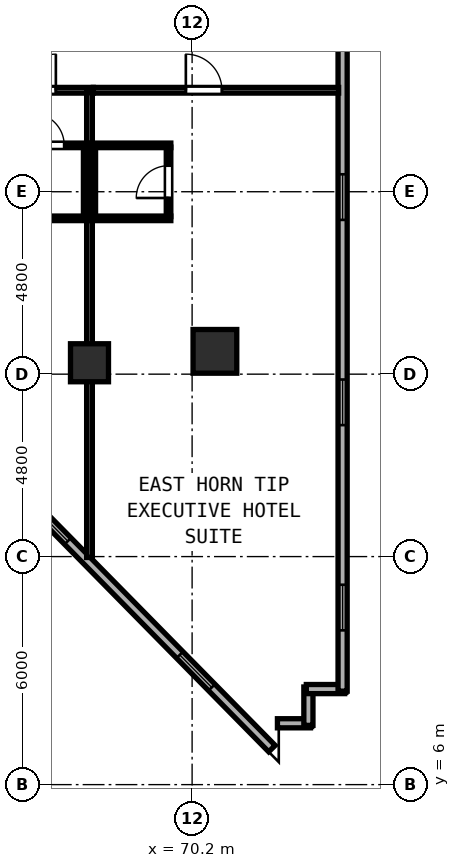
"""IFC4 building model, lengths in metres.
Left out: names, types, materials, properties, quantities, classifications, styles, units other than length and angle.
Written with IfcOpenShell. Run it as: python <this file> out.ifc"""

import sys

from ifc_helpers import new_model, si_unit, direction, frame, frame_2d, origin, origin_2d, place, context, subcontext, project, spatial, rectangle, hollow_rectangle, extrude, element, fill, save


model = new_model("IFC4")
c1 = context("Model", 3, precision=1e-05, world=origin(), true_north=direction((0.0, 1.0)))
c2 = subcontext(c1, "Body", "Model", "MODEL_VIEW")
j1 = project(units=[si_unit("LENGTHUNIT", "METRE"), si_unit("PLANEANGLEUNIT", "RADIAN")], contexts=[c1])
p1 = place(None, origin())
s1 = spatial("IfcSite", under=j1, at=p1, CompositionType="ELEMENT")
p2 = place(p1, origin())
s2 = spatial("IfcBuilding", under=s1, at=p2, CompositionType="ELEMENT")
p3 = place(p2, frame((0.0, 0.0, 39.2)))
s3 = spatial("IfcBuildingStorey", under=s2, at=p3, CompositionType="ELEMENT", Elevation=39.2)
p4 = place(p3, frame((70.8, 17.4, 0.0), z_axis=(0.0, 0.0, 1.0), x_axis=(1.0, 0.0, 0.0)))
e1 = element("IfcColumn", 1, at=p4, inside=s3, PredefinedType="COLUMN", context=c2, shape_type="SweptSolid", body=[
    extrude(hollow_rectangle(XDim=1.15, YDim=1.15, WallThickness=0.042, at=origin_2d()), origin(), (0.0, 0.0, 1.0), 3.8),
])
p5 = place(p3, frame((67.5, 17.1, 0.0), z_axis=(0.0, 0.0, 1.0), x_axis=(1.0, 0.0, 0.0)))
e2 = element("IfcColumn", 2, at=p5, inside=s3, PredefinedType="COLUMN", context=c2, shape_type="SweptSolid", body=[
    extrude(hollow_rectangle(XDim=1.0, YDim=1.0, WallThickness=0.038, at=origin_2d()), origin(), (0.0, 0.0, 1.0), 3.8),
])
p6 = place(p3, frame((64.966, 14.403, 0.0), z_axis=(0.0, 0.0, 1.0), x_axis=(0.701329027825, -0.712837705744, 0.0)))
e3 = element("IfcWall", 3, at=p6, inside=s3, PredefinedType="SOLIDWALL", context=c2, shape_type="SweptSolid", body=[
    extrude(rectangle(XDim=10.458, YDim=0.24, at=frame_2d((5.229, 0.0))), origin(), (0.0, 0.0, 1.0), 3.54),
])
p7 = place(p6, frame((1.6, 0.0, 0.85)))
e4 = element("IfcOpeningElement", 4, at=p7, cuts=e3, PredefinedType="OPENING", context=c2, shape_type="SweptSolid", body=[
    extrude(rectangle(XDim=1.2, YDim=1.85, at=frame_2d((0.6, 0.925))), frame((0.0, 0.13, 0.0), z_axis=(0.0, -1.0, 0.0), x_axis=(1.0, 0.0, 0.0)), (0.0, 0.0, 1.0), 0.26),
])
p8 = place(p6, frame((7.0, 0.0, 0.85)))
e5 = element("IfcOpeningElement", 5, at=p8, cuts=e3, PredefinedType="OPENING", context=c2, shape_type="SweptSolid", body=[
    extrude(rectangle(XDim=1.2, YDim=1.85, at=frame_2d((0.6, 0.925))), frame((0.0, 0.13, 0.0), z_axis=(0.0, -1.0, 0.0), x_axis=(1.0, 0.0, 0.0)), (0.0, 0.0, 1.0), 0.26),
])
p9 = place(p3, frame((72.445, 7.614, 0.0), z_axis=(0.0, 0.0, 1.0), x_axis=(1.0, 0.0, 0.0)))
e6 = element("IfcWall", 6, at=p9, inside=s3, PredefinedType="SOLIDWALL", context=c2, shape_type="SweptSolid", body=[
    extrude(rectangle(XDim=0.87, YDim=0.24, at=frame_2d((0.435, 0.0))), origin(), (0.0, 0.0, 1.0), 3.54),
])
for number, where, z_axis, x_axis in (
    (7, (73.26, 7.559, 0.0), (0.0, 0.0, 1.0), (0.0, 1.0, 0.0)),
    (8, (73.205, 8.514, 0.0), (0.0, 0.0, 1.0), (1.0, 0.0, 0.0)),
):
    element("IfcWall", number, at=place(p3, frame(where, z_axis=z_axis, x_axis=x_axis)), inside=s3, PredefinedType="SOLIDWALL", context=c2, shape_type="SweptSolid", body=[
        extrude(rectangle(XDim=1.01, YDim=0.24, at=frame_2d((0.505, 0.0))), origin(), (0.0, 0.0, 1.0), 3.54),
    ])
p10 = place(p3, frame((74.16, 8.459, 0.0), z_axis=(0.0, 0.0, 1.0), x_axis=(0.0, 1.0, 0.0)))
e9 = element("IfcWall", 9, at=p10, inside=s3, PredefinedType="SOLIDWALL", context=c2, shape_type="SweptSolid", body=[
    extrude(rectangle(XDim=20.349, YDim=0.24, at=frame_2d((10.175, 0.0))), origin(), (0.0, 0.0, 1.0), 3.54),
])
p11 = place(p10, frame((1.6, 0.0, 0.85)))
e10 = element("IfcOpeningElement", 10, at=p11, cuts=e9, PredefinedType="OPENING", context=c2, shape_type="SweptSolid", body=[
    extrude(rectangle(XDim=1.2, YDim=1.85, at=frame_2d((0.6, 0.925))), frame((0.0, 0.13, 0.0), z_axis=(0.0, -1.0, 0.0), x_axis=(1.0, 0.0, 0.0)), (0.0, 0.0, 1.0), 0.26),
])
p12 = place(p10, frame((7.0, 0.0, 0.85)))
e11 = element("IfcOpeningElement", 11, at=p12, cuts=e9, PredefinedType="OPENING", context=c2, shape_type="SweptSolid", body=[
    extrude(rectangle(XDim=1.2, YDim=1.85, at=frame_2d((0.6, 0.925))), frame((0.0, 0.13, 0.0), z_axis=(0.0, -1.0, 0.0), x_axis=(1.0, 0.0, 0.0)), (0.0, 0.0, 1.0), 0.26),
])
p13 = place(p10, frame((12.4, 0.0, 0.85)))
e12 = element("IfcOpeningElement", 12, at=p13, cuts=e9, PredefinedType="OPENING", context=c2, shape_type="SweptSolid", body=[
    extrude(rectangle(XDim=1.2, YDim=1.85, at=frame_2d((0.6, 0.925))), frame((0.0, 0.13, 0.0), z_axis=(0.0, -1.0, 0.0), x_axis=(1.0, 0.0, 0.0)), (0.0, 0.0, 1.0), 0.26),
])
p14 = place(p10, frame((17.8, 0.0, 0.85)))
e13 = element("IfcOpeningElement", 13, at=p14, cuts=e9, PredefinedType="OPENING", context=c2, shape_type="SweptSolid", body=[
    extrude(rectangle(XDim=1.2, YDim=1.85, at=frame_2d((0.6, 0.925))), frame((0.0, 0.13, 0.0), z_axis=(0.0, -1.0, 0.0), x_axis=(1.0, 0.0, 0.0)), (0.0, 0.0, 1.0), 0.26),
])
p15 = place(p3, frame((65.102, 24.27, 0.0), z_axis=(0.0, 0.0, 1.0), x_axis=(1.0, 0.0, 0.0)))
e14 = element("IfcWall", 14, at=p15, inside=s3, PredefinedType="PARTITIONING", context=c2, shape_type="SweptSolid", body=[
    extrude(rectangle(XDim=2.498, YDim=0.15, at=frame_2d((1.249, 0.0))), origin(), (0.0, 0.0, 1.0), 3.54),
])
p16 = place(p15, frame((1.513, 0.0, 0.0), z_axis=(0.0, 0.0, 1.0), x_axis=(-1.0, 0.0, 0.0)))
e15 = element("IfcOpeningElement", 15, at=p16, cuts=e14, PredefinedType="OPENING", context=c2, shape_type="SweptSolid", body=[
    extrude(rectangle(XDim=0.95, YDim=2.15, at=frame_2d((0.475, 1.075))), frame((0.0, 0.085, 0.0), z_axis=(0.0, -1.0, 0.0), x_axis=(1.0, 0.0, 0.0)), (0.0, 0.0, 1.0), 0.17),
])
p17 = place(p3, frame((67.5, 11.977, 0.0), z_axis=(0.0, 0.0, 1.0), x_axis=(0.0, 1.0, 0.0)))
e16 = element("IfcWall", 16, at=p17, inside=s3, PredefinedType="PARTITIONING", context=c2, shape_type="SweptSolid", body=[
    extrude(rectangle(XDim=12.233, YDim=0.15, at=frame_2d((6.117, 0.0))), origin(), (0.0, 0.0, 1.0), 3.54),
])
p18 = place(p3, frame((65.36, 22.82, 0.0), z_axis=(0.0, 0.0, 1.0), x_axis=(1.0, 0.0, 0.0)))
e17 = element("IfcWall", 17, at=p18, inside=s3, PredefinedType="PARTITIONING", context=c2, shape_type="SweptSolid", body=[
    extrude(rectangle(XDim=2.08, YDim=0.12, at=frame_2d((1.04, 0.0))), origin(), (0.0, 0.0, 1.0), 3.54),
])
p19 = place(p18, frame((1.475, 0.0, 0.0), z_axis=(0.0, 0.0, 1.0), x_axis=(-1.0, 0.0, 0.0)))
e18 = element("IfcOpeningElement", 18, at=p19, cuts=e17, PredefinedType="OPENING", context=c2, shape_type="SweptSolid", body=[
    extrude(rectangle(XDim=0.85, YDim=2.1, at=frame_2d((0.425, 1.05))), frame((0.0, 0.07, 0.0), z_axis=(0.0, -1.0, 0.0), x_axis=(1.0, 0.0, 0.0)), (0.0, 0.0, 1.0), 0.14),
])
p20 = place(p3, frame((65.36, 20.9, 0.0), z_axis=(0.0, 0.0, 1.0), x_axis=(1.0, 0.0, 0.0)))
e19 = element("IfcWall", 19, at=p20, inside=s3, PredefinedType="PARTITIONING", context=c2, shape_type="SweptSolid", body=[
    extrude(rectangle(XDim=2.08, YDim=0.12, at=frame_2d((1.04, 0.0))), origin(), (0.0, 0.0, 1.0), 3.54),
])
p21 = place(p3, frame((67.4, 20.945, 0.0), z_axis=(0.0, 0.0, 1.0), x_axis=(0.0, 1.0, 0.0)))
e20 = element("IfcWall", 20, at=p21, inside=s3, PredefinedType="PARTITIONING", context=c2, shape_type="SweptSolid", body=[
    extrude(rectangle(XDim=1.83, YDim=0.12, at=frame_2d((0.915, 0.0))), origin(), (0.0, 0.0, 1.0), 3.54),
])
p22 = place(p3, frame((67.602, 24.27, 0.0), z_axis=(0.0, 0.0, 1.0), x_axis=(1.0, 0.0, 0.0)))
e21 = element("IfcWall", 21, at=p22, inside=s3, PredefinedType="PARTITIONING", context=c2, shape_type="SweptSolid", body=[
    extrude(rectangle(XDim=6.453, YDim=0.15, at=frame_2d((3.227, 0.0))), origin(), (0.0, 0.0, 1.0), 3.54),
])
p23 = place(p22, frame((3.383, 0.0, 0.0), z_axis=(0.0, 0.0, 1.0), x_axis=(-1.0, 0.0, 0.0)))
e22 = element("IfcOpeningElement", 22, at=p23, cuts=e21, PredefinedType="OPENING", context=c2, shape_type="SweptSolid", body=[
    extrude(rectangle(XDim=0.95, YDim=2.18, at=frame_2d((0.475, 1.09))), frame((0.0, 0.085, 0.0), z_axis=(0.0, -1.0, 0.0), x_axis=(1.0, 0.0, 0.0)), (0.0, 0.0, 1.0), 0.17),
])
for number, where, z_axis, x_axis in (
    (23, (67.56, 22.82, 0.0), (0.0, 0.0, 1.0), (1.0, 0.0, 0.0)),
    (24, (67.56, 20.9, 0.0), (0.0, 0.0, 1.0), (1.0, 0.0, 0.0)),
):
    element("IfcWall", number, at=place(p3, frame(where, z_axis=z_axis, x_axis=x_axis)), inside=s3, PredefinedType="PARTITIONING", context=c2, shape_type="SweptSolid", body=[
        extrude(rectangle(XDim=2.08, YDim=0.12, at=frame_2d((1.04, 0.0))), origin(), (0.0, 0.0, 1.0), 3.54),
    ])
p24 = place(p3, frame((67.6, 20.945, 0.0), z_axis=(0.0, 0.0, 1.0), x_axis=(0.0, 1.0, 0.0)))
e25 = element("IfcWall", 25, at=p24, inside=s3, PredefinedType="PARTITIONING", context=c2, shape_type="SweptSolid", body=[
    extrude(rectangle(XDim=1.83, YDim=0.12, at=frame_2d((0.915, 0.0))), origin(), (0.0, 0.0, 1.0), 3.54),
])
p25 = place(p3, frame((69.58, 20.945, 0.0), z_axis=(0.0, 0.0, 1.0), x_axis=(0.0, 1.0, 0.0)))
e26 = element("IfcWall", 26, at=p25, inside=s3, PredefinedType="PARTITIONING", context=c2, shape_type="SweptSolid", body=[
    extrude(rectangle(XDim=1.83, YDim=0.12, at=frame_2d((0.915, 0.0))), origin(), (0.0, 0.0, 1.0), 3.54),
])
p26 = place(p25, frame((0.49, 0.0, 0.0)))
e27 = element("IfcOpeningElement", 27, at=p26, cuts=e26, PredefinedType="OPENING", context=c2, shape_type="SweptSolid", body=[
    extrude(rectangle(XDim=0.85, YDim=2.1, at=frame_2d((0.425, 1.05))), frame((0.0, 0.07, 0.0), z_axis=(0.0, -1.0, 0.0), x_axis=(1.0, 0.0, 0.0)), (0.0, 0.0, 1.0), 0.14),
])
p27 = place(p7, origin())
e28 = element("IfcWindow", 28, at=p27, inside=s3, PartitioningType="SINGLE_PANEL", PredefinedType="WINDOW", context=c2, shape_type="SweptSolid", body=[
    extrude(rectangle(XDim=1.2, YDim=1.85, at=frame_2d((0.6, 0.925))), frame((0.0, 0.03, 0.0), z_axis=(0.0, -1.0, 0.0), x_axis=(1.0, 0.0, 0.0)), (0.0, 0.0, 1.0), 0.06),
])
fill(e4, e28)
p28 = place(p8, origin())
e29 = element("IfcWindow", 29, at=p28, inside=s3, PartitioningType="SINGLE_PANEL", PredefinedType="WINDOW", context=c2, shape_type="SweptSolid", body=[
    extrude(rectangle(XDim=1.2, YDim=1.85, at=frame_2d((0.6, 0.925))), frame((0.0, 0.03, 0.0), z_axis=(0.0, -1.0, 0.0), x_axis=(1.0, 0.0, 0.0)), (0.0, 0.0, 1.0), 0.06),
])
fill(e5, e29)
p29 = place(p11, origin())
e30 = element("IfcWindow", 30, at=p29, inside=s3, PartitioningType="SINGLE_PANEL", PredefinedType="WINDOW", context=c2, shape_type="SweptSolid", body=[
    extrude(rectangle(XDim=1.2, YDim=1.85, at=frame_2d((0.6, 0.925))), frame((0.0, 0.03, 0.0), z_axis=(0.0, -1.0, 0.0), x_axis=(1.0, 0.0, 0.0)), (0.0, 0.0, 1.0), 0.06),
])
fill(e10, e30)
p30 = place(p12, origin())
e31 = element("IfcWindow", 31, at=p30, inside=s3, PartitioningType="SINGLE_PANEL", PredefinedType="WINDOW", context=c2, shape_type="SweptSolid", body=[
    extrude(rectangle(XDim=1.2, YDim=1.85, at=frame_2d((0.6, 0.925))), frame((0.0, 0.03, 0.0), z_axis=(0.0, -1.0, 0.0), x_axis=(1.0, 0.0, 0.0)), (0.0, 0.0, 1.0), 0.06),
])
fill(e11, e31)
p31 = place(p13, origin())
e32 = element("IfcWindow", 32, at=p31, inside=s3, PartitioningType="SINGLE_PANEL", PredefinedType="WINDOW", context=c2, shape_type="SweptSolid", body=[
    extrude(rectangle(XDim=1.2, YDim=1.85, at=frame_2d((0.6, 0.925))), frame((0.0, 0.03, 0.0), z_axis=(0.0, -1.0, 0.0), x_axis=(1.0, 0.0, 0.0)), (0.0, 0.0, 1.0), 0.06),
])
fill(e12, e32)
p32 = place(p16, origin())
e33 = element("IfcDoor", 33, at=p32, inside=s3, OperationType="SINGLE_SWING_LEFT", PredefinedType="DOOR", context=c2, shape_type="SweptSolid", body=[
    extrude(rectangle(XDim=0.95, YDim=2.15, at=frame_2d((0.475, 1.075))), frame((0.0, 0.025, 0.0), z_axis=(0.0, -1.0, 0.0), x_axis=(1.0, 0.0, 0.0)), (0.0, 0.0, 1.0), 0.05),
])
fill(e15, e33)
p33 = place(p19, origin())
e34 = element("IfcDoor", 34, at=p33, inside=s3, OperationType="SINGLE_SWING_RIGHT", PredefinedType="DOOR", context=c2, shape_type="SweptSolid", body=[
    extrude(rectangle(XDim=0.85, YDim=2.1, at=frame_2d((0.425, 1.05))), frame((0.0, 0.025, 0.0), z_axis=(0.0, -1.0, 0.0), x_axis=(1.0, 0.0, 0.0)), (0.0, 0.0, 1.0), 0.05),
])
fill(e18, e34)
p34 = place(p23, origin())
e35 = element("IfcDoor", 35, at=p34, inside=s3, OperationType="SINGLE_SWING_RIGHT", PredefinedType="DOOR", context=c2, shape_type="SweptSolid", body=[
    extrude(rectangle(XDim=0.95, YDim=2.18, at=frame_2d((0.475, 1.09))), frame((0.0, 0.025, 0.0), z_axis=(0.0, -1.0, 0.0), x_axis=(1.0, 0.0, 0.0)), (0.0, 0.0, 1.0), 0.05),
])
fill(e22, e35)
p35 = place(p26, origin())
e36 = element("IfcDoor", 36, at=p35, inside=s3, OperationType="SINGLE_SWING_LEFT", PredefinedType="DOOR", context=c2, shape_type="SweptSolid", body=[
    extrude(rectangle(XDim=0.85, YDim=2.1, at=frame_2d((0.425, 1.05))), frame((0.0, 0.025, 0.0), z_axis=(0.0, -1.0, 0.0), x_axis=(1.0, 0.0, 0.0)), (0.0, 0.0, 1.0), 0.05),
])
fill(e27, e36)
save(model, sys.argv[1])
